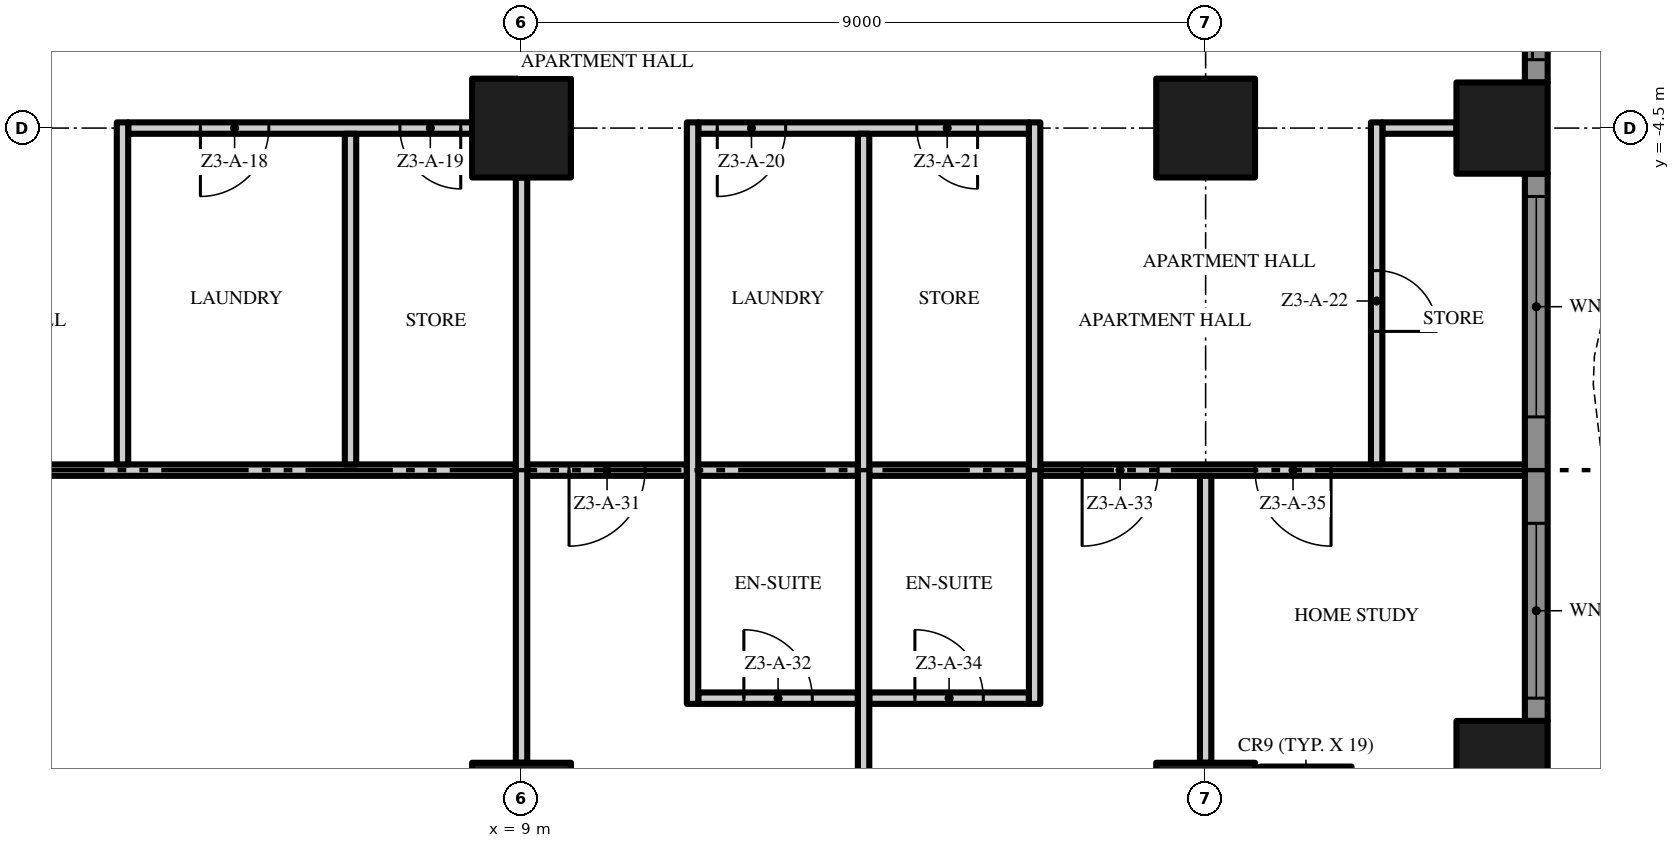
"""IFC4 building model, lengths in metres.
Left out: names, types, materials, properties, quantities, classifications, styles, units other than length and angle.
Written with IfcOpenShell. Run it as: python <this file> out.ifc"""

import sys

from ifc_helpers import new_model, si_unit, direction, frame, frame_2d, origin, origin_2d, place, context, subcontext, project, spatial, polyline, rectangle, outline, extrude, element, fill, save


model = new_model("IFC4")
c1 = context("Model", 3, precision=1e-05, world=origin(), true_north=direction((0.0, 1.0)))
c2 = subcontext(c1, "Body", "Model", "MODEL_VIEW")
j1 = project(units=[si_unit("LENGTHUNIT", "METRE"), si_unit("PLANEANGLEUNIT", "RADIAN")], contexts=[c1])
p1 = place(None, origin())
s1 = spatial("IfcSite", under=j1, at=p1, CompositionType="ELEMENT")
p2 = place(p1, origin())
s2 = spatial("IfcBuilding", under=s1, at=p2, CompositionType="ELEMENT")
p3 = place(p2, frame((0.0, 0.0, 125.0)))
s3 = spatial("IfcBuildingStorey", under=s2, at=p3, CompositionType="ELEMENT", Elevation=125.0)
for number, where, z_axis, x_axis in (
    (1, (18.0, -13.5, 0.0), (0.0, 0.0, 1.0), (1.0, 0.0, 0.0)),
    (2, (18.0, -4.5, 0.0), (0.0, 0.0, 1.0), (1.0, 0.0, 0.0)),
):
    element("IfcColumn", number, at=place(p3, frame(where, z_axis=z_axis, x_axis=x_axis)), inside=s3, PredefinedType="COLUMN", context=c2, shape_type="SweptSolid", body=[
        extrude(rectangle(XDim=1.3, YDim=1.3, at=origin_2d()), origin(), (0.0, 0.0, 1.0), 3.5),
    ])
for number, where, z_axis, x_axis in (
    (3, (21.9, -12.9, 0.0), (0.0, 0.0, 1.0), (1.0, 0.0, 0.0)),
    (4, (19.32, -13.5, 0.0), (0.0, 0.0, 1.0), (1.0, 0.0, 0.0)),
    (5, (21.9, -4.5, 0.0), (0.0, 0.0, 1.0), (1.0, 0.0, 0.0)),
):
    element("IfcColumn", number, at=place(p3, frame(where, z_axis=z_axis, x_axis=x_axis)), inside=s3, PredefinedType="COLUMN", context=c2, shape_type="SweptSolid", body=[
        extrude(rectangle(XDim=1.2, YDim=1.2, at=origin_2d()), origin(), (0.0, 0.0, 1.0), 3.5),
    ])
for number, where, z_axis, x_axis in (
    (6, (9.0, -13.5, 0.0), (0.0, 0.0, 1.0), (1.0, 0.0, 0.0)),
    (7, (9.0, -4.5, 0.0), (0.0, 0.0, 1.0), (1.0, 0.0, 0.0)),
):
    element("IfcColumn", number, at=place(p3, frame(where, z_axis=z_axis, x_axis=x_axis)), inside=s3, PredefinedType="COLUMN", context=c2, shape_type="SweptSolid", body=[
        extrude(rectangle(XDim=1.3, YDim=1.3, at=origin_2d()), origin(), (0.0, 0.0, 1.0), 3.5),
    ])
p4 = place(p3, frame((22.35, -5.1, 0.0), z_axis=(0.0, 0.0, 1.0), x_axis=(0.0, -1.0, 0.0)))
e8 = element("IfcWall", 8, at=p4, inside=s3, PredefinedType="SOLIDWALL", context=c2, shape_type="SweptSolid", body=[
    extrude(rectangle(XDim=7.2, YDim=0.3, at=frame_2d((3.6, 0.0))), origin(), (0.0, 0.0, 1.0), 3.5),
])
p5 = place(p4, frame((4.6, 0.0, 0.45)))
e9 = element("IfcOpeningElement", 9, at=p5, cuts=e8, PredefinedType="OPENING", context=c2, shape_type="SweptSolid", body=[
    extrude(rectangle(XDim=2.3, YDim=2.65, at=frame_2d((1.15, 1.325))), frame((0.0, 0.16, 0.0), z_axis=(0.0, -1.0, 0.0), x_axis=(1.0, 0.0, 0.0)), (0.0, 0.0, 1.0), 0.32),
])
p6 = place(p4, frame((0.3, 0.0, 0.45)))
e10 = element("IfcOpeningElement", 10, at=p6, cuts=e8, PredefinedType="OPENING", context=c2, shape_type="SweptSolid", body=[
    extrude(rectangle(XDim=2.9, YDim=2.65, at=frame_2d((1.45, 1.325))), frame((0.0, 0.16, 0.0), z_axis=(0.0, -1.0, 0.0), x_axis=(1.0, 0.0, 0.0)), (0.0, 0.0, 1.0), 0.32),
])
p7 = place(p3, frame((22.35, 3.9, 0.0), z_axis=(0.0, 0.0, 1.0), x_axis=(0.0, -1.0, 0.0)))
e11 = element("IfcWall", 11, at=p7, inside=s3, PredefinedType="SOLIDWALL", context=c2, shape_type="SweptSolid", body=[
    extrude(rectangle(XDim=7.8, YDim=0.3, at=frame_2d((3.9, 0.0))), origin(), (0.0, 0.0, 1.0), 3.5),
])
p8 = place(p7, frame((4.6, 0.0, 0.0)))
e12 = element("IfcOpeningElement", 12, at=p8, cuts=e11, PredefinedType="OPENING", context=c2, shape_type="SweptSolid", body=[
    extrude(rectangle(XDim=2.9, YDim=2.4, at=frame_2d((1.45, 1.2))), frame((0.0, 0.16, 0.0), z_axis=(0.0, -1.0, 0.0), x_axis=(1.0, 0.0, 0.0)), (0.0, 0.0, 1.0), 0.32),
])
p9 = place(p7, frame((0.3, 0.0, 0.0)))
e13 = element("IfcOpeningElement", 13, at=p9, cuts=e11, PredefinedType="OPENING", context=c2, shape_type="SweptSolid", body=[
    extrude(rectangle(XDim=2.9, YDim=2.4, at=frame_2d((1.45, 1.2))), frame((0.0, 0.16, 0.0), z_axis=(0.0, -1.0, 0.0), x_axis=(1.0, 0.0, 0.0)), (0.0, 0.0, 1.0), 0.32),
])
p10 = place(p3, origin())
e14 = element("IfcWall", 14, at=p10, inside=s3, PredefinedType="USERDEFINED", context=c2, shape_type="SweptSolid", body=[
    extrude(outline(polyline([(25.149, -13.5), (24.488, -12.0), (23.755, -10.5), (23.231, -9.0), (23.1, -7.875), (23.115, -7.5), (23.451, -6.0), (24.112, -4.5), (24.845, -3.0), (25.369, -1.5), (25.5, -0.375), (25.485, 0.0), (25.149, 1.5), (24.488, 3.0), (23.755, 4.5), (23.231, 6.0), (23.1, 7.125), (23.115, 7.5), (23.451, 9.0), (24.112, 10.5), (24.845, 12.0), (25.369, 13.5), (25.5, 14.625), (25.485, 15.0), (25.149, 16.5), (24.488, 18.0), (24.259, 17.899), (24.91, 16.421), (25.236, 14.967), (25.249, 14.635), (25.124, 13.556), (24.614, 12.096), (23.885, 10.605), (23.213, 9.079), (22.866, 7.533), (22.849, 7.115), (22.986, 5.944), (23.524, 4.404), (24.261, 2.895), (24.91, 1.421), (25.236, -0.033), (25.249, -0.365), (25.124, -1.444), (24.614, -2.904), (23.885, -4.395), (23.213, -5.921), (22.866, -7.467), (22.849, -7.885), (22.986, -9.056), (23.524, -10.596), (24.261, -12.105), (24.92, -13.601), (25.149, -13.5)])), origin(), (0.0, 0.0, 1.0), 0.9),
])
p11 = place(p3, frame((11.325, -12.0, 0.0), z_axis=(0.0, 0.0, 1.0), x_axis=(1.0, 0.0, 0.0)))
e15 = element("IfcWall", 15, at=p11, inside=s3, PredefinedType="PARTITIONING", context=c2, shape_type="SweptSolid", body=[
    extrude(rectangle(XDim=2.1, YDim=0.15, at=frame_2d((1.05, 0.0))), origin(), (0.0, 0.0, 1.0), 3.5),
])
p12 = place(p11, frame((0.6, 0.0, 0.0)))
e16 = element("IfcOpeningElement", 16, at=p12, cuts=e15, PredefinedType="OPENING", context=c2, shape_type="SweptSolid", body=[
    extrude(rectangle(XDim=0.9, YDim=2.1, at=frame_2d((0.45, 1.05))), frame((0.0, 0.085, 0.0), z_axis=(0.0, -1.0, 0.0), x_axis=(1.0, 0.0, 0.0)), (0.0, 0.0, 1.0), 0.17),
])
p13 = place(p3, frame((13.575, -12.0, 0.0), z_axis=(0.0, 0.0, 1.0), x_axis=(1.0, 0.0, 0.0)))
e17 = element("IfcWall", 17, at=p13, inside=s3, PredefinedType="PARTITIONING", context=c2, shape_type="SweptSolid", body=[
    extrude(rectangle(XDim=2.1, YDim=0.15, at=frame_2d((1.05, 0.0))), origin(), (0.0, 0.0, 1.0), 3.5),
])
p14 = place(p13, frame((0.6, 0.0, 0.0)))
e18 = element("IfcOpeningElement", 18, at=p14, cuts=e17, PredefinedType="OPENING", context=c2, shape_type="SweptSolid", body=[
    extrude(rectangle(XDim=0.9, YDim=2.1, at=frame_2d((0.45, 1.05))), frame((0.0, 0.085, 0.0), z_axis=(0.0, -1.0, 0.0), x_axis=(1.0, 0.0, 0.0)), (0.0, 0.0, 1.0), 0.17),
])
p15 = place(p3, frame((8.925, -9.0, 0.0), z_axis=(0.0, 0.0, 1.0), x_axis=(-1.0, 0.0, 0.0)))
e19 = element("IfcWall", 19, at=p15, inside=s3, PredefinedType="PARTITIONING", context=c2, shape_type="SweptSolid", body=[
    extrude(rectangle(XDim=8.85, YDim=0.15, at=frame_2d((4.425, 0.0))), origin(), (0.0, 0.0, 1.0), 3.5),
])
p16 = place(p15, frame((6.3, 0.0, 0.0)))
e20 = element("IfcOpeningElement", 20, at=p16, cuts=e19, PredefinedType="OPENING", context=c2, shape_type="SweptSolid", body=[
    extrude(rectangle(XDim=1.5, YDim=2.4, at=frame_2d((0.75, 1.2))), frame((0.0, 0.085, 0.0), z_axis=(0.0, -1.0, 0.0), x_axis=(1.0, 0.0, 0.0)), (0.0, 0.0, 1.0), 0.17),
])
p17 = place(p3, frame((11.175, -9.0, 0.0), z_axis=(0.0, 0.0, 1.0), x_axis=(-1.0, 0.0, 0.0)))
e21 = element("IfcWall", 21, at=p17, inside=s3, PredefinedType="PARTITIONING", context=c2, shape_type="SweptSolid", body=[
    extrude(rectangle(XDim=2.1, YDim=0.15, at=frame_2d((1.05, 0.0))), origin(), (0.0, 0.0, 1.0), 3.5),
])
p18 = place(p17, frame((0.55, 0.0, 0.0)))
e22 = element("IfcOpeningElement", 22, at=p18, cuts=e21, PredefinedType="OPENING", context=c2, shape_type="SweptSolid", body=[
    extrude(rectangle(XDim=1.0, YDim=2.4, at=frame_2d((0.5, 1.2))), frame((0.0, 0.085, 0.0), z_axis=(0.0, -1.0, 0.0), x_axis=(1.0, 0.0, 0.0)), (0.0, 0.0, 1.0), 0.17),
])
for number, where, z_axis, x_axis in (
    (23, (11.325, -9.0, 0.0), (0.0, 0.0, 1.0), (1.0, 0.0, 0.0)),
    (24, (13.575, -9.0, 0.0), (0.0, 0.0, 1.0), (1.0, 0.0, 0.0)),
):
    element("IfcWall", number, at=place(p3, frame(where, z_axis=z_axis, x_axis=x_axis)), inside=s3, PredefinedType="PARTITIONING", context=c2, shape_type="SweptSolid", body=[
        extrude(rectangle(XDim=2.1, YDim=0.15, at=frame_2d((1.05, 0.0))), origin(), (0.0, 0.0, 1.0), 3.5),
    ])
p19 = place(p3, frame((22.2, -9.0, 0.0), z_axis=(0.0, 0.0, 1.0), x_axis=(-1.0, 0.0, 0.0)))
e25 = element("IfcWall", 25, at=p19, inside=s3, PredefinedType="PARTITIONING", context=c2, shape_type="SweptSolid", body=[
    extrude(rectangle(XDim=6.375, YDim=0.15, at=frame_2d((3.188, 0.0))), origin(), (0.0, 0.0, 1.0), 3.5),
])
p20 = place(p19, frame((4.825, 0.0, 0.0)))
e26 = element("IfcOpeningElement", 26, at=p20, cuts=e25, PredefinedType="OPENING", context=c2, shape_type="SweptSolid", body=[
    extrude(rectangle(XDim=1.0, YDim=2.4, at=frame_2d((0.5, 1.2))), frame((0.0, 0.085, 0.0), z_axis=(0.0, -1.0, 0.0), x_axis=(1.0, 0.0, 0.0)), (0.0, 0.0, 1.0), 0.17),
])
p21 = place(p19, frame((2.55, 0.0, 0.0)))
e27 = element("IfcOpeningElement", 27, at=p21, cuts=e25, PredefinedType="OPENING", context=c2, shape_type="SweptSolid", body=[
    extrude(rectangle(XDim=1.0, YDim=2.4, at=frame_2d((0.5, 1.2))), frame((0.0, 0.085, 0.0), z_axis=(0.0, -1.0, 0.0), x_axis=(1.0, 0.0, 0.0)), (0.0, 0.0, 1.0), 0.17),
])
p22 = place(p3, frame((8.35, -4.5, 0.0), z_axis=(0.0, 0.0, 1.0), x_axis=(-1.0, 0.0, 0.0)))
e28 = element("IfcWall", 28, at=p22, inside=s3, PredefinedType="PARTITIONING", context=c2, shape_type="SweptSolid", body=[
    extrude(rectangle(XDim=4.525, YDim=0.15, at=frame_2d((2.263, 0.0))), origin(), (0.0, 0.0, 1.0), 3.5),
])
p23 = place(p22, frame((2.675, 0.0, 0.0)))
e29 = element("IfcOpeningElement", 29, at=p23, cuts=e28, PredefinedType="OPENING", context=c2, shape_type="SweptSolid", body=[
    extrude(rectangle(XDim=0.9, YDim=2.1, at=frame_2d((0.45, 1.05))), frame((0.0, 0.085, 0.0), z_axis=(0.0, -1.0, 0.0), x_axis=(1.0, 0.0, 0.0)), (0.0, 0.0, 1.0), 0.17),
])
p24 = place(p22, frame((0.15, 0.0, 0.0)))
e30 = element("IfcOpeningElement", 30, at=p24, cuts=e28, PredefinedType="OPENING", context=c2, shape_type="SweptSolid", body=[
    extrude(rectangle(XDim=0.8, YDim=2.0, at=frame_2d((0.4, 1.0))), frame((0.0, 0.085, 0.0), z_axis=(0.0, -1.0, 0.0), x_axis=(1.0, 0.0, 0.0)), (0.0, 0.0, 1.0), 0.17),
])
p25 = place(p3, frame((15.675, -4.5, 0.0), z_axis=(0.0, 0.0, 1.0), x_axis=(-1.0, 0.0, 0.0)))
e31 = element("IfcWall", 31, at=p25, inside=s3, PredefinedType="PARTITIONING", context=c2, shape_type="SweptSolid", body=[
    extrude(rectangle(XDim=4.35, YDim=0.15, at=frame_2d((2.175, 0.0))), origin(), (0.0, 0.0, 1.0), 3.5),
])
p26 = place(p25, frame((3.2, 0.0, 0.0)))
e32 = element("IfcOpeningElement", 32, at=p26, cuts=e31, PredefinedType="OPENING", context=c2, shape_type="SweptSolid", body=[
    extrude(rectangle(XDim=0.9, YDim=2.1, at=frame_2d((0.45, 1.05))), frame((0.0, 0.085, 0.0), z_axis=(0.0, -1.0, 0.0), x_axis=(1.0, 0.0, 0.0)), (0.0, 0.0, 1.0), 0.17),
])
p27 = place(p25, frame((0.675, 0.0, 0.0)))
e33 = element("IfcOpeningElement", 33, at=p27, cuts=e31, PredefinedType="OPENING", context=c2, shape_type="SweptSolid", body=[
    extrude(rectangle(XDim=0.8, YDim=2.0, at=frame_2d((0.4, 1.0))), frame((0.0, 0.085, 0.0), z_axis=(0.0, -1.0, 0.0), x_axis=(1.0, 0.0, 0.0)), (0.0, 0.0, 1.0), 0.17),
])
p28 = place(p3, frame((20.325, -4.5, 0.0), z_axis=(0.0, 0.0, 1.0), x_axis=(1.0, 0.0, 0.0)))
e34 = element("IfcWall", 34, at=p28, inside=s3, PredefinedType="PARTITIONING", context=c2, shape_type="SweptSolid", body=[
    extrude(rectangle(XDim=0.975, YDim=0.15, at=frame_2d((0.487, 0.0))), origin(), (0.0, 0.0, 1.0), 3.5),
])
p29 = place(p3, frame((3.75, -8.925, 0.0), z_axis=(0.0, 0.0, 1.0), x_axis=(0.0, 1.0, 0.0)))
e35 = element("IfcWall", 35, at=p29, inside=s3, PredefinedType="PARTITIONING", context=c2, shape_type="SweptSolid", body=[
    extrude(rectangle(XDim=4.5, YDim=0.15, at=frame_2d((2.25, 0.0))), origin(), (0.0, 0.0, 1.0), 3.5),
])
p30 = place(p3, frame((6.75, -8.925, 0.0), z_axis=(0.0, 0.0, 1.0), x_axis=(0.0, 1.0, 0.0)))
e36 = element("IfcWall", 36, at=p30, inside=s3, PredefinedType="PARTITIONING", context=c2, shape_type="SweptSolid", body=[
    extrude(rectangle(XDim=4.35, YDim=0.15, at=frame_2d((2.175, 0.0))), origin(), (0.0, 0.0, 1.0), 3.5),
])
p31 = place(p3, frame((9.0, -12.85, 0.0), z_axis=(0.0, 0.0, 1.0), x_axis=(0.0, 1.0, 0.0)))
e37 = element("IfcWall", 37, at=p31, inside=s3, PredefinedType="PARTITIONING", context=c2, shape_type="SweptSolid", body=[
    extrude(rectangle(XDim=7.7, YDim=0.15, at=frame_2d((3.85, 0.0))), origin(), (0.0, 0.0, 1.0), 3.5),
])
p32 = place(p3, frame((11.25, -12.075, 0.0), z_axis=(0.0, 0.0, 1.0), x_axis=(0.0, 1.0, 0.0)))
e38 = element("IfcWall", 38, at=p32, inside=s3, PredefinedType="PARTITIONING", context=c2, shape_type="SweptSolid", body=[
    extrude(rectangle(XDim=7.65, YDim=0.15, at=frame_2d((3.825, 0.0))), origin(), (0.0, 0.0, 1.0), 3.5),
])
p33 = place(p3, frame((13.5, -17.7, 0.0), z_axis=(0.0, 0.0, 1.0), x_axis=(0.0, 1.0, 0.0)))
e39 = element("IfcWall", 39, at=p33, inside=s3, PredefinedType="PARTITIONING", context=c2, shape_type="SweptSolid", body=[
    extrude(rectangle(XDim=13.125, YDim=0.15, at=frame_2d((6.562, 0.0))), origin(), (0.0, 0.0, 1.0), 3.5),
])
p34 = place(p3, frame((15.75, -12.075, 0.0), z_axis=(0.0, 0.0, 1.0), x_axis=(0.0, 1.0, 0.0)))
e40 = element("IfcWall", 40, at=p34, inside=s3, PredefinedType="PARTITIONING", context=c2, shape_type="SweptSolid", body=[
    extrude(rectangle(XDim=7.65, YDim=0.15, at=frame_2d((3.825, 0.0))), origin(), (0.0, 0.0, 1.0), 3.5),
])
p35 = place(p3, frame((18.0, -12.85, 0.0), z_axis=(0.0, 0.0, 1.0), x_axis=(0.0, 1.0, 0.0)))
e41 = element("IfcWall", 41, at=p35, inside=s3, PredefinedType="PARTITIONING", context=c2, shape_type="SweptSolid", body=[
    extrude(rectangle(XDim=3.775, YDim=0.15, at=frame_2d((1.887, 0.0))), origin(), (0.0, 0.0, 1.0), 3.5),
])
p36 = place(p3, frame((20.25, -4.425, 0.0), z_axis=(0.0, 0.0, 1.0), x_axis=(0.0, -1.0, 0.0)))
e42 = element("IfcWall", 42, at=p36, inside=s3, PredefinedType="PARTITIONING", context=c2, shape_type="SweptSolid", body=[
    extrude(rectangle(XDim=4.5, YDim=0.15, at=frame_2d((2.25, 0.0))), origin(), (0.0, 0.0, 1.0), 3.5),
])
p37 = place(p36, frame((1.95, 0.0, 0.0)))
e43 = element("IfcOpeningElement", 43, at=p37, cuts=e42, PredefinedType="OPENING", context=c2, shape_type="SweptSolid", body=[
    extrude(rectangle(XDim=0.8, YDim=2.0, at=frame_2d((0.4, 1.0))), frame((0.0, 0.085, 0.0), z_axis=(0.0, -1.0, 0.0), x_axis=(1.0, 0.0, 0.0)), (0.0, 0.0, 1.0), 0.17),
])
p38 = place(p5, origin())
e44 = element("IfcWindow", 44, at=p38, inside=s3, PartitioningType="SINGLE_PANEL", PredefinedType="WINDOW", context=c2, shape_type="SweptSolid", body=[
    extrude(rectangle(XDim=2.3, YDim=2.65, at=frame_2d((1.15, 1.325))), frame((0.0, 0.03, 0.0), z_axis=(0.0, -1.0, 0.0), x_axis=(1.0, 0.0, 0.0)), (0.0, 0.0, 1.0), 0.06),
])
fill(e9, e44)
p39 = place(p6, origin())
e45 = element("IfcWindow", 45, at=p39, inside=s3, PartitioningType="SINGLE_PANEL", PredefinedType="WINDOW", context=c2, shape_type="SweptSolid", body=[
    extrude(rectangle(XDim=2.9, YDim=2.65, at=frame_2d((1.45, 1.325))), frame((0.0, 0.03, 0.0), z_axis=(0.0, -1.0, 0.0), x_axis=(1.0, 0.0, 0.0)), (0.0, 0.0, 1.0), 0.06),
])
fill(e10, e45)
p40 = place(p8, origin())
e46 = element("IfcDoor", 46, at=p40, inside=s3, OperationType="SINGLE_SWING_LEFT", PredefinedType="DOOR", context=c2, shape_type="SweptSolid", body=[
    extrude(rectangle(XDim=2.9, YDim=2.4, at=frame_2d((1.45, 1.2))), frame((0.0, 0.025, 0.0), z_axis=(0.0, -1.0, 0.0), x_axis=(1.0, 0.0, 0.0)), (0.0, 0.0, 1.0), 0.05),
])
fill(e12, e46)
p41 = place(p23, origin())
e47 = element("IfcDoor", 47, at=p41, inside=s3, OperationType="SINGLE_SWING_RIGHT", PredefinedType="DOOR", context=c2, shape_type="SweptSolid", body=[
    extrude(rectangle(XDim=0.9, YDim=2.1, at=frame_2d((0.45, 1.05))), frame((0.0, 0.025, 0.0), z_axis=(0.0, -1.0, 0.0), x_axis=(1.0, 0.0, 0.0)), (0.0, 0.0, 1.0), 0.05),
])
fill(e29, e47)
p42 = place(p24, origin())
e48 = element("IfcDoor", 48, at=p42, inside=s3, OperationType="SINGLE_SWING_LEFT", PredefinedType="DOOR", context=c2, shape_type="SweptSolid", body=[
    extrude(rectangle(XDim=0.8, YDim=2.0, at=frame_2d((0.4, 1.0))), frame((0.0, 0.025, 0.0), z_axis=(0.0, -1.0, 0.0), x_axis=(1.0, 0.0, 0.0)), (0.0, 0.0, 1.0), 0.05),
])
fill(e30, e48)
p43 = place(p26, origin())
e49 = element("IfcDoor", 49, at=p43, inside=s3, OperationType="SINGLE_SWING_RIGHT", PredefinedType="DOOR", context=c2, shape_type="SweptSolid", body=[
    extrude(rectangle(XDim=0.9, YDim=2.1, at=frame_2d((0.45, 1.05))), frame((0.0, 0.025, 0.0), z_axis=(0.0, -1.0, 0.0), x_axis=(1.0, 0.0, 0.0)), (0.0, 0.0, 1.0), 0.05),
])
fill(e32, e49)
p44 = place(p27, origin())
e50 = element("IfcDoor", 50, at=p44, inside=s3, OperationType="SINGLE_SWING_LEFT", PredefinedType="DOOR", context=c2, shape_type="SweptSolid", body=[
    extrude(rectangle(XDim=0.8, YDim=2.0, at=frame_2d((0.4, 1.0))), frame((0.0, 0.025, 0.0), z_axis=(0.0, -1.0, 0.0), x_axis=(1.0, 0.0, 0.0)), (0.0, 0.0, 1.0), 0.05),
])
fill(e33, e50)
p45 = place(p37, origin())
e51 = element("IfcDoor", 51, at=p45, inside=s3, OperationType="SINGLE_SWING_RIGHT", PredefinedType="DOOR", context=c2, shape_type="SweptSolid", body=[
    extrude(rectangle(XDim=0.8, YDim=2.0, at=frame_2d((0.4, 1.0))), frame((0.0, 0.025, 0.0), z_axis=(0.0, -1.0, 0.0), x_axis=(1.0, 0.0, 0.0)), (0.0, 0.0, 1.0), 0.05),
])
fill(e43, e51)
p46 = place(p18, origin())
e52 = element("IfcDoor", 52, at=p46, inside=s3, OperationType="SINGLE_SWING_RIGHT", PredefinedType="DOOR", context=c2, shape_type="SweptSolid", body=[
    extrude(rectangle(XDim=1.0, YDim=2.4, at=frame_2d((0.5, 1.2))), frame((0.0, 0.025, 0.0), z_axis=(0.0, -1.0, 0.0), x_axis=(1.0, 0.0, 0.0)), (0.0, 0.0, 1.0), 0.05),
])
fill(e22, e52)
p47 = place(p12, origin())
e53 = element("IfcDoor", 53, at=p47, inside=s3, OperationType="SINGLE_SWING_LEFT", PredefinedType="DOOR", context=c2, shape_type="SweptSolid", body=[
    extrude(rectangle(XDim=0.9, YDim=2.1, at=frame_2d((0.45, 1.05))), frame((0.0, 0.025, 0.0), z_axis=(0.0, -1.0, 0.0), x_axis=(1.0, 0.0, 0.0)), (0.0, 0.0, 1.0), 0.05),
])
fill(e16, e53)
p48 = place(p20, origin())
e54 = element("IfcDoor", 54, at=p48, inside=s3, OperationType="SINGLE_SWING_RIGHT", PredefinedType="DOOR", context=c2, shape_type="SweptSolid", body=[
    extrude(rectangle(XDim=1.0, YDim=2.4, at=frame_2d((0.5, 1.2))), frame((0.0, 0.025, 0.0), z_axis=(0.0, -1.0, 0.0), x_axis=(1.0, 0.0, 0.0)), (0.0, 0.0, 1.0), 0.05),
])
fill(e26, e54)
p49 = place(p14, origin())
e55 = element("IfcDoor", 55, at=p49, inside=s3, OperationType="SINGLE_SWING_LEFT", PredefinedType="DOOR", context=c2, shape_type="SweptSolid", body=[
    extrude(rectangle(XDim=0.9, YDim=2.1, at=frame_2d((0.45, 1.05))), frame((0.0, 0.025, 0.0), z_axis=(0.0, -1.0, 0.0), x_axis=(1.0, 0.0, 0.0)), (0.0, 0.0, 1.0), 0.05),
])
fill(e18, e55)
p50 = place(p21, origin())
e56 = element("IfcDoor", 56, at=p50, inside=s3, OperationType="SINGLE_SWING_LEFT", PredefinedType="DOOR", context=c2, shape_type="SweptSolid", body=[
    extrude(rectangle(XDim=1.0, YDim=2.4, at=frame_2d((0.5, 1.2))), frame((0.0, 0.025, 0.0), z_axis=(0.0, -1.0, 0.0), x_axis=(1.0, 0.0, 0.0)), (0.0, 0.0, 1.0), 0.05),
])
fill(e27, e56)
save(model, sys.argv[1])
